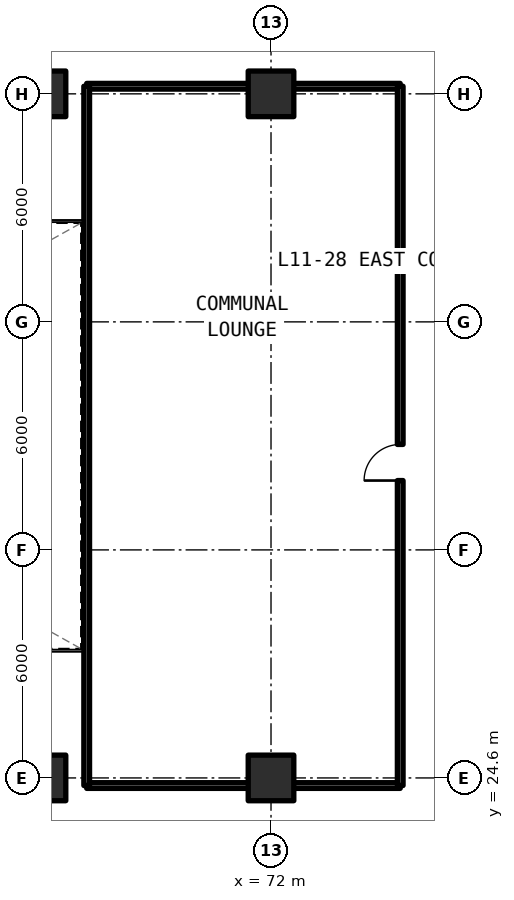
"""IFC4 building model, lengths in metres.
Left out: names, types, materials, properties, quantities, classifications, styles, units other than length and angle.
Written with IfcOpenShell. Run it as: python <this file> out.ifc"""

import sys

from ifc_helpers import new_model, si_unit, direction, frame, frame_2d, origin, origin_2d, place, context, subcontext, project, spatial, rectangle, extrude, element, fill, save


model = new_model("IFC4")
c1 = context("Model", 3, precision=1e-05, world=origin(), true_north=direction((0.0, 1.0)))
c2 = subcontext(c1, "Body", "Model", "MODEL_VIEW")
j1 = project(units=[si_unit("LENGTHUNIT", "METRE"), si_unit("PLANEANGLEUNIT", "RADIAN")], contexts=[c1])
p1 = place(None, origin())
s1 = spatial("IfcSite", under=j1, at=p1, CompositionType="ELEMENT")
p2 = place(p1, origin())
s2 = spatial("IfcBuilding", under=s1, at=p2, CompositionType="ELEMENT")
p3 = place(p2, frame((0.0, 0.0, 42.24)))
s3 = spatial("IfcBuildingStorey", under=s2, at=p3, CompositionType="ELEMENT", Elevation=42.24)
for number, where, z_axis, x_axis in (
    (1, (66.0, 24.6, 0.0), (0.0, 0.0, 1.0), (1.0, 0.0, 0.0)),
    (2, (66.0, 42.6, 0.0), (0.0, 0.0, 1.0), (1.0, 0.0, 0.0)),
    (3, (72.0, 24.6, 0.0), (0.0, 0.0, 1.0), (1.0, 0.0, 0.0)),
    (4, (72.0, 42.6, 0.0), (0.0, 0.0, 1.0), (1.0, 0.0, 0.0)),
):
    element("IfcColumn", number, at=place(p3, frame(where, z_axis=z_axis, x_axis=x_axis)), inside=s3, PredefinedType="COLUMN", context=c2, shape_type="SweptSolid", body=[
        extrude(rectangle(XDim=1.2, YDim=1.2, at=origin_2d()), origin(), (0.0, 0.0, 1.0), 3.3),
    ])
for number, where, z_axis, x_axis in (
    (5, (67.15, 24.4, 0.0), (0.0, 0.0, 1.0), (1.0, 0.0, 0.0)),
    (6, (67.15, 42.8, 0.0), (0.0, 0.0, 1.0), (1.0, 0.0, 0.0)),
):
    element("IfcWall", number, at=place(p3, frame(where, z_axis=z_axis, x_axis=x_axis)), inside=s3, PredefinedType="SOLIDWALL", context=c2, shape_type="SweptSolid", body=[
        extrude(rectangle(XDim=8.25, YDim=0.15, at=frame_2d((4.125, 0.0))), origin(), (0.0, 0.0, 1.0), 2.295),
    ])
p4 = place(p3, frame((67.15, 24.4, 0.0), z_axis=(0.0, 0.0, 1.0), x_axis=(0.0, 1.0, 0.0)))
e7 = element("IfcWall", 7, at=p4, inside=s3, PredefinedType="SOLIDWALL", context=c2, shape_type="SweptSolid", body=[
    extrude(rectangle(XDim=18.4, YDim=0.15, at=frame_2d((9.2, 0.0))), origin(), (0.0, 0.0, 1.0), 2.35),
])
p5 = place(p3, frame((75.4, 24.4, 0.0), z_axis=(0.0, 0.0, 1.0), x_axis=(0.0, 1.0, 0.0)))
e8 = element("IfcWall", 8, at=p5, inside=s3, PredefinedType="SOLIDWALL", context=c2, shape_type="SweptSolid", body=[
    extrude(rectangle(XDim=18.4, YDim=0.15, at=frame_2d((9.2, 0.0))), origin(), (0.0, 0.0, 1.0), 2.35),
])
p6 = place(p5, frame((8.025, 0.0, 0.0)))
e9 = element("IfcOpeningElement", 9, at=p6, cuts=e8, PredefinedType="OPENING", context=c2, shape_type="SweptSolid", body=[
    extrude(rectangle(XDim=0.95, YDim=2.15, at=frame_2d((0.475, 1.075))), frame((0.0, 0.085, 0.0), z_axis=(0.0, -1.0, 0.0), x_axis=(1.0, 0.0, 0.0)), (0.0, 0.0, 1.0), 0.17),
])
p7 = place(p6, origin())
e10 = element("IfcDoor", 10, at=p7, inside=s3, OperationType="SINGLE_SWING_LEFT", PredefinedType="DOOR", context=c2, shape_type="SweptSolid", body=[
    extrude(rectangle(XDim=0.95, YDim=2.15, at=frame_2d((0.475, 1.075))), frame((0.0, 0.025, 0.0), z_axis=(0.0, -1.0, 0.0), x_axis=(1.0, 0.0, 0.0)), (0.0, 0.0, 1.0), 0.05),
])
fill(e9, e10)
save(model, sys.argv[1])
